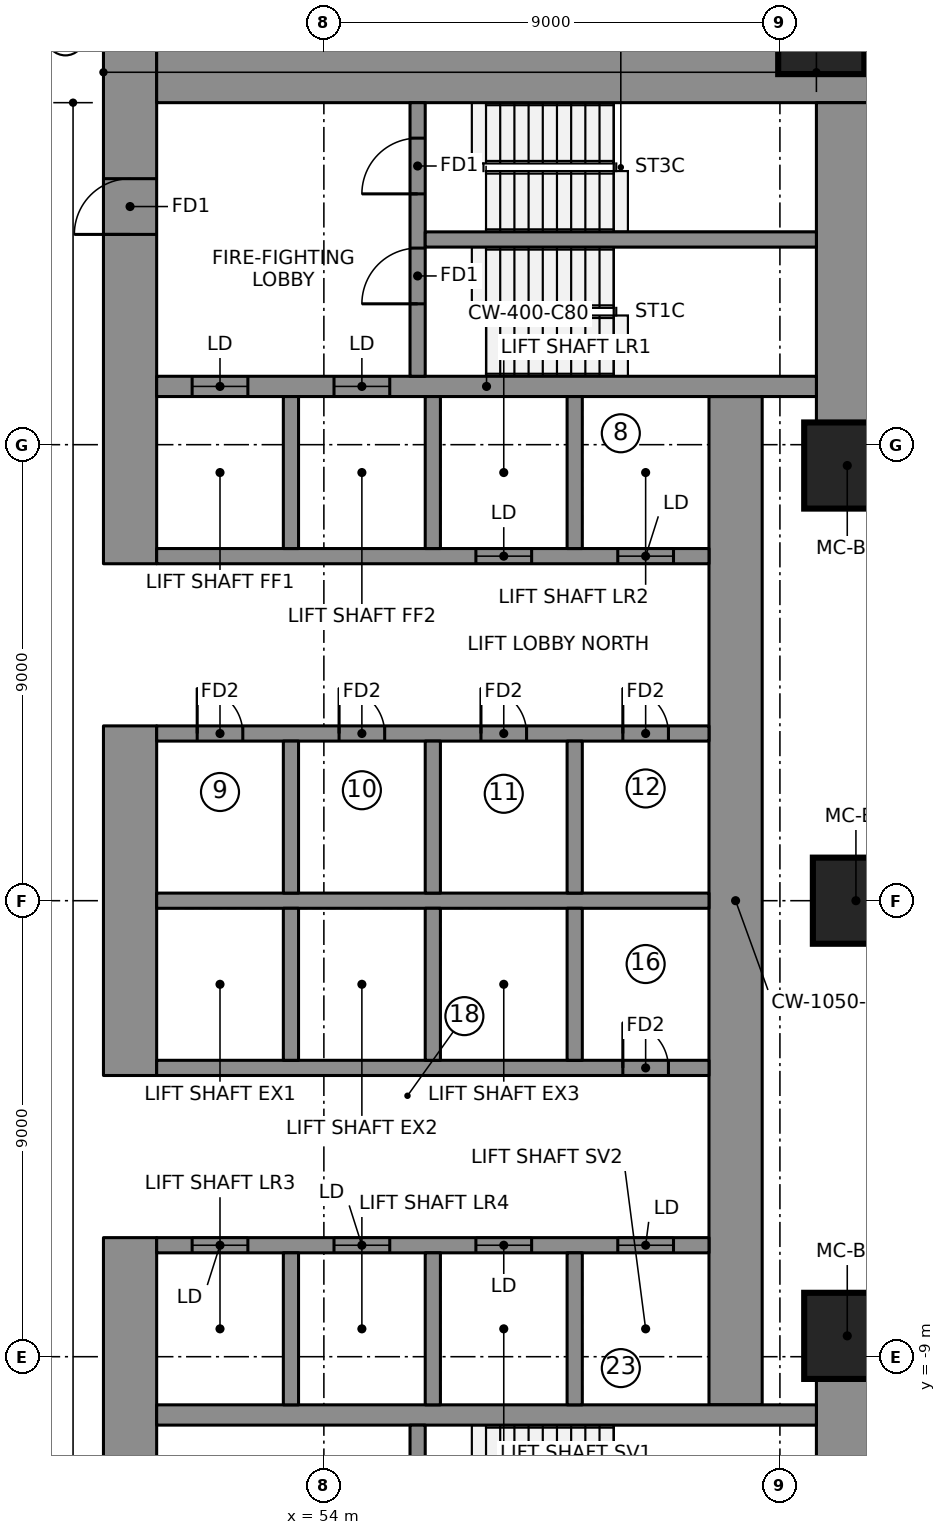
"""IFC4 building model, lengths in metres.
Left out: names, types, materials, properties, quantities, classifications, styles, units other than length and angle.
Written with IfcOpenShell. Run it as: python <this file> out.ifc"""

import sys

from ifc_helpers import new_model, si_unit, direction, frame, frame_2d, origin, origin_2d, place, context, subcontext, project, spatial, rectangle, extrude, element, fill, save


model = new_model("IFC4")
c1 = context("Model", 3, precision=1e-05, world=origin(), true_north=direction((0.0, 1.0)))
c2 = subcontext(c1, "Body", "Model", "MODEL_VIEW")
j1 = project(units=[si_unit("LENGTHUNIT", "METRE"), si_unit("PLANEANGLEUNIT", "RADIAN")], contexts=[c1])
p1 = place(None, origin())
s1 = spatial("IfcSite", under=j1, at=p1, CompositionType="ELEMENT")
p2 = place(p1, origin())
s2 = spatial("IfcBuilding", under=s1, at=p2, CompositionType="ELEMENT")
p3 = place(p2, frame((0.0, 0.0, 88.45)))
s3 = spatial("IfcBuildingStorey", under=s2, at=p3, CompositionType="ELEMENT", Elevation=88.45)
p4 = place(p3, frame((50.175, 6.65, 0.0), z_axis=(0.0, 0.0, 1.0), x_axis=(0.0, 1.0, 0.0)))
e1 = element("IfcWall", 1, at=p4, inside=s3, PredefinedType="SHEAR", context=c2, shape_type="SweptSolid", body=[
    extrude(rectangle(XDim=10.15, YDim=1.05, at=frame_2d((5.075, 0.0))), origin(), (0.0, 0.0, 1.0), 3.55),
])
p5 = place(p4, frame((6.5, 0.0, 0.0)))
e2 = element("IfcOpeningElement", 2, at=p5, cuts=e1, PredefinedType="OPENING", context=c2, shape_type="SweptSolid", body=[
    extrude(rectangle(XDim=1.1, YDim=2.1, at=frame_2d((0.55, 1.05))), frame((0.0, 0.535, 0.0), z_axis=(0.0, -1.0, 0.0), x_axis=(1.0, 0.0, 0.0)), (0.0, 0.0, 1.0), 1.07),
])
p6 = place(p3, frame((50.175, -3.45, 0.0), z_axis=(0.0, 0.0, 1.0), x_axis=(0.0, 1.0, 0.0)))
e3 = element("IfcWall", 3, at=p6, inside=s3, PredefinedType="SHEAR", context=c2, shape_type="SweptSolid", body=[
    extrude(rectangle(XDim=6.9, YDim=1.05, at=frame_2d((3.45, 0.0))), origin(), (0.0, 0.0, 1.0), 3.55),
])
p7 = place(p3, frame((50.175, -16.8, 0.0), z_axis=(0.0, 0.0, 1.0), x_axis=(0.0, 1.0, 0.0)))
e4 = element("IfcWall", 4, at=p7, inside=s3, PredefinedType="SHEAR", context=c2, shape_type="SweptSolid", body=[
    extrude(rectangle(XDim=10.15, YDim=1.05, at=frame_2d((5.075, 0.0))), origin(), (0.0, 0.0, 1.0), 3.55),
])
p8 = place(p7, frame((2.55, 0.0, 0.0)))
e5 = element("IfcOpeningElement", 5, at=p8, cuts=e4, PredefinedType="OPENING", context=c2, shape_type="SweptSolid", body=[
    extrude(rectangle(XDim=1.1, YDim=2.1, at=frame_2d((0.55, 1.05))), frame((0.0, 0.535, 0.0), z_axis=(0.0, -1.0, 0.0), x_axis=(1.0, 0.0, 0.0)), (0.0, 0.0, 1.0), 1.07),
])
p9 = place(p3, frame((50.7, 16.275, 0.0), z_axis=(0.0, 0.0, 1.0), x_axis=(1.0, 0.0, 0.0)))
e6 = element("IfcWall", 6, at=p9, inside=s3, PredefinedType="SHEAR", context=c2, shape_type="SweptSolid", body=[
    extrude(rectangle(XDim=14.07, YDim=1.05, at=frame_2d((7.035, 0.0))), origin(), (0.0, 0.0, 1.0), 3.55),
])
for number, where, z_axis, x_axis in (
    (7, (64.245, 9.389, 0.0), (0.0, 0.0, 1.0), (0.0, 1.0, 0.0)),
    (8, (64.245, -15.75, 0.0), (0.0, 0.0, 1.0), (0.0, 1.0, 0.0)),
):
    element("IfcWall", number, at=place(p3, frame(where, z_axis=z_axis, x_axis=x_axis)), inside=s3, PredefinedType="SHEAR", context=c2, shape_type="SweptSolid", body=[
        extrude(rectangle(XDim=6.361, YDim=1.05, at=frame_2d((3.181, 0.0))), origin(), (0.0, 0.0, 1.0), 3.55),
    ])
p10 = place(p3, frame((62.125, -9.95, 0.0), z_axis=(0.0, 0.0, 1.0), x_axis=(0.0, 1.0, 0.0)))
e9 = element("IfcWall", 9, at=p10, inside=s3, PredefinedType="SHEAR", context=c2, shape_type="SweptSolid", body=[
    extrude(rectangle(XDim=19.9, YDim=1.05, at=frame_2d((9.95, 0.0))), origin(), (0.0, 0.0, 1.0), 3.55),
])
p11 = place(p3, frame((50.7, 10.15, 0.0), z_axis=(0.0, 0.0, 1.0), x_axis=(1.0, 0.0, 0.0)))
e10 = element("IfcWall", 10, at=p11, inside=s3, PredefinedType="SHEAR", context=c2, shape_type="SweptSolid", body=[
    extrude(rectangle(XDim=13.02, YDim=0.4, at=frame_2d((6.51, 0.0))), origin(), (0.0, 0.0, 1.0), 3.55),
])
p12 = place(p11, frame((0.7, 0.0, 0.0)))
e11 = element("IfcOpeningElement", 11, at=p12, cuts=e10, PredefinedType="OPENING", context=c2, shape_type="SweptSolid", body=[
    extrude(rectangle(XDim=1.1, YDim=2.1, at=frame_2d((0.55, 1.05))), frame((0.0, 0.21, 0.0), z_axis=(0.0, -1.0, 0.0), x_axis=(1.0, 0.0, 0.0)), (0.0, 0.0, 1.0), 0.42),
])
p13 = place(p11, frame((3.5, 0.0, 0.0)))
e12 = element("IfcOpeningElement", 12, at=p13, cuts=e10, PredefinedType="OPENING", context=c2, shape_type="SweptSolid", body=[
    extrude(rectangle(XDim=1.1, YDim=2.1, at=frame_2d((0.55, 1.05))), frame((0.0, 0.21, 0.0), z_axis=(0.0, -1.0, 0.0), x_axis=(1.0, 0.0, 0.0)), (0.0, 0.0, 1.0), 0.42),
])
p14 = place(p3, frame((50.7, -10.15, 0.0), z_axis=(0.0, 0.0, 1.0), x_axis=(1.0, 0.0, 0.0)))
e13 = element("IfcWall", 13, at=p14, inside=s3, PredefinedType="SHEAR", context=c2, shape_type="SweptSolid", body=[
    extrude(rectangle(XDim=13.02, YDim=0.4, at=frame_2d((6.51, 0.0))), origin(), (0.0, 0.0, 1.0), 3.55),
])
p15 = place(p3, frame((50.7, 0.0, 0.0), z_axis=(0.0, 0.0, 1.0), x_axis=(1.0, 0.0, 0.0)))
e14 = element("IfcWall", 14, at=p15, inside=s3, PredefinedType="SHEAR", context=c2, shape_type="SweptSolid", body=[
    extrude(rectangle(XDim=10.9, YDim=0.3, at=frame_2d((5.45, 0.0))), origin(), (0.0, 0.0, 1.0), 3.55),
])
p16 = place(p3, frame((50.7, 3.3, 0.0), z_axis=(0.0, 0.0, 1.0), x_axis=(1.0, 0.0, 0.0)))
e15 = element("IfcWall", 15, at=p16, inside=s3, PredefinedType="SHEAR", context=c2, shape_type="SweptSolid", body=[
    extrude(rectangle(XDim=10.9, YDim=0.3, at=frame_2d((5.45, 0.0))), origin(), (0.0, 0.0, 1.0), 3.55),
])
p17 = place(p16, frame((0.8, 0.0, 0.0)))
e16 = element("IfcOpeningElement", 16, at=p17, cuts=e15, PredefinedType="OPENING", context=c2, shape_type="SweptSolid", body=[
    extrude(rectangle(XDim=0.9, YDim=2.1, at=frame_2d((0.45, 1.05))), frame((0.0, 0.16, 0.0), z_axis=(0.0, -1.0, 0.0), x_axis=(1.0, 0.0, 0.0)), (0.0, 0.0, 1.0), 0.32),
])
p18 = place(p16, frame((3.6, 0.0, 0.0)))
e17 = element("IfcOpeningElement", 17, at=p18, cuts=e15, PredefinedType="OPENING", context=c2, shape_type="SweptSolid", body=[
    extrude(rectangle(XDim=0.9, YDim=2.1, at=frame_2d((0.45, 1.05))), frame((0.0, 0.16, 0.0), z_axis=(0.0, -1.0, 0.0), x_axis=(1.0, 0.0, 0.0)), (0.0, 0.0, 1.0), 0.32),
])
p19 = place(p16, frame((6.4, 0.0, 0.0)))
e18 = element("IfcOpeningElement", 18, at=p19, cuts=e15, PredefinedType="OPENING", context=c2, shape_type="SweptSolid", body=[
    extrude(rectangle(XDim=0.9, YDim=2.1, at=frame_2d((0.45, 1.05))), frame((0.0, 0.16, 0.0), z_axis=(0.0, -1.0, 0.0), x_axis=(1.0, 0.0, 0.0)), (0.0, 0.0, 1.0), 0.32),
])
p20 = place(p16, frame((9.2, 0.0, 0.0)))
e19 = element("IfcOpeningElement", 19, at=p20, cuts=e15, PredefinedType="OPENING", context=c2, shape_type="SweptSolid", body=[
    extrude(rectangle(XDim=0.9, YDim=2.1, at=frame_2d((0.45, 1.05))), frame((0.0, 0.16, 0.0), z_axis=(0.0, -1.0, 0.0), x_axis=(1.0, 0.0, 0.0)), (0.0, 0.0, 1.0), 0.32),
])
p21 = place(p3, frame((50.7, 6.8, 0.0), z_axis=(0.0, 0.0, 1.0), x_axis=(1.0, 0.0, 0.0)))
e20 = element("IfcWall", 20, at=p21, inside=s3, PredefinedType="SHEAR", context=c2, shape_type="SweptSolid", body=[
    extrude(rectangle(XDim=10.9, YDim=0.3, at=frame_2d((5.45, 0.0))), origin(), (0.0, 0.0, 1.0), 3.55),
])
p22 = place(p21, frame((6.3, 0.0, 0.0)))
e21 = element("IfcOpeningElement", 21, at=p22, cuts=e20, PredefinedType="OPENING", context=c2, shape_type="SweptSolid", body=[
    extrude(rectangle(XDim=1.1, YDim=2.1, at=frame_2d((0.55, 1.05))), frame((0.0, 0.16, 0.0), z_axis=(0.0, -1.0, 0.0), x_axis=(1.0, 0.0, 0.0)), (0.0, 0.0, 1.0), 0.32),
])
p23 = place(p21, frame((9.1, 0.0, 0.0)))
e22 = element("IfcOpeningElement", 22, at=p23, cuts=e20, PredefinedType="OPENING", context=c2, shape_type="SweptSolid", body=[
    extrude(rectangle(XDim=1.1, YDim=2.1, at=frame_2d((0.55, 1.05))), frame((0.0, 0.16, 0.0), z_axis=(0.0, -1.0, 0.0), x_axis=(1.0, 0.0, 0.0)), (0.0, 0.0, 1.0), 0.32),
])
for number, where, z_axis, x_axis in (
    (23, (53.35, 0.15, 0.0), (0.0, 0.0, 1.0), (0.0, 1.0, 0.0)),
    (24, (53.35, 6.95, 0.0), (0.0, 0.0, 1.0), (0.0, 1.0, 0.0)),
    (25, (56.15, 0.15, 0.0), (0.0, 0.0, 1.0), (0.0, 1.0, 0.0)),
    (26, (56.15, 6.95, 0.0), (0.0, 0.0, 1.0), (0.0, 1.0, 0.0)),
    (27, (58.95, 0.15, 0.0), (0.0, 0.0, 1.0), (0.0, 1.0, 0.0)),
    (28, (58.95, 6.95, 0.0), (0.0, 0.0, 1.0), (0.0, 1.0, 0.0)),
):
    element("IfcWall", number, at=place(p3, frame(where, z_axis=z_axis, x_axis=x_axis)), inside=s3, PredefinedType="SHEAR", context=c2, shape_type="SweptSolid", body=[
        extrude(rectangle(XDim=3.0, YDim=0.3, at=frame_2d((1.5, 0.0))), origin(), (0.0, 0.0, 1.0), 3.55),
    ])
p24 = place(p3, frame((50.7, -3.3, 0.0), z_axis=(0.0, 0.0, 1.0), x_axis=(1.0, 0.0, 0.0)))
e29 = element("IfcWall", 29, at=p24, inside=s3, PredefinedType="SHEAR", context=c2, shape_type="SweptSolid", body=[
    extrude(rectangle(XDim=10.9, YDim=0.3, at=frame_2d((5.45, 0.0))), origin(), (0.0, 0.0, 1.0), 3.55),
])
p25 = place(p24, frame((9.2, 0.0, 0.0)))
e30 = element("IfcOpeningElement", 30, at=p25, cuts=e29, PredefinedType="OPENING", context=c2, shape_type="SweptSolid", body=[
    extrude(rectangle(XDim=0.9, YDim=2.1, at=frame_2d((0.45, 1.05))), frame((0.0, 0.16, 0.0), z_axis=(0.0, -1.0, 0.0), x_axis=(1.0, 0.0, 0.0)), (0.0, 0.0, 1.0), 0.32),
])
p26 = place(p3, frame((50.7, -6.8, 0.0), z_axis=(0.0, 0.0, 1.0), x_axis=(1.0, 0.0, 0.0)))
e31 = element("IfcWall", 31, at=p26, inside=s3, PredefinedType="SHEAR", context=c2, shape_type="SweptSolid", body=[
    extrude(rectangle(XDim=10.9, YDim=0.3, at=frame_2d((5.45, 0.0))), origin(), (0.0, 0.0, 1.0), 3.55),
])
p27 = place(p26, frame((0.7, 0.0, 0.0)))
e32 = element("IfcOpeningElement", 32, at=p27, cuts=e31, PredefinedType="OPENING", context=c2, shape_type="SweptSolid", body=[
    extrude(rectangle(XDim=1.1, YDim=2.1, at=frame_2d((0.55, 1.05))), frame((0.0, 0.16, 0.0), z_axis=(0.0, -1.0, 0.0), x_axis=(1.0, 0.0, 0.0)), (0.0, 0.0, 1.0), 0.32),
])
p28 = place(p26, frame((3.5, 0.0, 0.0)))
e33 = element("IfcOpeningElement", 33, at=p28, cuts=e31, PredefinedType="OPENING", context=c2, shape_type="SweptSolid", body=[
    extrude(rectangle(XDim=1.1, YDim=2.1, at=frame_2d((0.55, 1.05))), frame((0.0, 0.16, 0.0), z_axis=(0.0, -1.0, 0.0), x_axis=(1.0, 0.0, 0.0)), (0.0, 0.0, 1.0), 0.32),
])
p29 = place(p26, frame((6.3, 0.0, 0.0)))
e34 = element("IfcOpeningElement", 34, at=p29, cuts=e31, PredefinedType="OPENING", context=c2, shape_type="SweptSolid", body=[
    extrude(rectangle(XDim=1.1, YDim=2.1, at=frame_2d((0.55, 1.05))), frame((0.0, 0.16, 0.0), z_axis=(0.0, -1.0, 0.0), x_axis=(1.0, 0.0, 0.0)), (0.0, 0.0, 1.0), 0.32),
])
p30 = place(p26, frame((9.1, 0.0, 0.0)))
e35 = element("IfcOpeningElement", 35, at=p30, cuts=e31, PredefinedType="OPENING", context=c2, shape_type="SweptSolid", body=[
    extrude(rectangle(XDim=1.1, YDim=2.1, at=frame_2d((0.55, 1.05))), frame((0.0, 0.16, 0.0), z_axis=(0.0, -1.0, 0.0), x_axis=(1.0, 0.0, 0.0)), (0.0, 0.0, 1.0), 0.32),
])
for number, where, z_axis, x_axis in (
    (36, (53.35, -3.15, 0.0), (0.0, 0.0, 1.0), (0.0, 1.0, 0.0)),
    (37, (53.35, -9.95, 0.0), (0.0, 0.0, 1.0), (0.0, 1.0, 0.0)),
    (38, (56.15, -3.15, 0.0), (0.0, 0.0, 1.0), (0.0, 1.0, 0.0)),
    (39, (56.15, -9.95, 0.0), (0.0, 0.0, 1.0), (0.0, 1.0, 0.0)),
    (40, (58.95, -3.15, 0.0), (0.0, 0.0, 1.0), (0.0, 1.0, 0.0)),
    (41, (58.95, -9.95, 0.0), (0.0, 0.0, 1.0), (0.0, 1.0, 0.0)),
):
    element("IfcWall", number, at=place(p3, frame(where, z_axis=z_axis, x_axis=x_axis)), inside=s3, PredefinedType="SHEAR", context=c2, shape_type="SweptSolid", body=[
        extrude(rectangle(XDim=3.0, YDim=0.3, at=frame_2d((1.5, 0.0))), origin(), (0.0, 0.0, 1.0), 3.55),
    ])
p31 = place(p3, frame((55.85, 10.35, 0.0), z_axis=(0.0, 0.0, 1.0), x_axis=(0.0, 1.0, 0.0)))
e42 = element("IfcWall", 42, at=p31, inside=s3, PredefinedType="SHEAR", context=c2, shape_type="SweptSolid", body=[
    extrude(rectangle(XDim=5.4, YDim=0.3, at=frame_2d((2.7, 0.0))), origin(), (0.0, 0.0, 1.0), 3.55),
])
p32 = place(p31, frame((1.43, 0.0, 0.0)))
e43 = element("IfcOpeningElement", 43, at=p32, cuts=e42, PredefinedType="OPENING", context=c2, shape_type="SweptSolid", body=[
    extrude(rectangle(XDim=1.1, YDim=2.1, at=frame_2d((0.55, 1.05))), frame((0.0, 0.16, 0.0), z_axis=(0.0, -1.0, 0.0), x_axis=(1.0, 0.0, 0.0)), (0.0, 0.0, 1.0), 0.32),
])
p33 = place(p31, frame((3.6, 0.0, 0.0)))
e44 = element("IfcOpeningElement", 44, at=p33, cuts=e42, PredefinedType="OPENING", context=c2, shape_type="SweptSolid", body=[
    extrude(rectangle(XDim=1.1, YDim=2.1, at=frame_2d((0.55, 1.05))), frame((0.0, 0.16, 0.0), z_axis=(0.0, -1.0, 0.0), x_axis=(1.0, 0.0, 0.0)), (0.0, 0.0, 1.0), 0.32),
])
p34 = place(p3, frame((55.85, -15.75, 0.0), z_axis=(0.0, 0.0, 1.0), x_axis=(0.0, 1.0, 0.0)))
e45 = element("IfcWall", 45, at=p34, inside=s3, PredefinedType="SHEAR", context=c2, shape_type="SweptSolid", body=[
    extrude(rectangle(XDim=5.4, YDim=0.3, at=frame_2d((2.7, 0.0))), origin(), (0.0, 0.0, 1.0), 3.55),
])
p35 = place(p34, frame((3.6, 0.0, 0.0)))
e46 = element("IfcOpeningElement", 46, at=p35, cuts=e45, PredefinedType="OPENING", context=c2, shape_type="SweptSolid", body=[
    extrude(rectangle(XDim=1.1, YDim=2.1, at=frame_2d((0.55, 1.05))), frame((0.0, 0.16, 0.0), z_axis=(0.0, -1.0, 0.0), x_axis=(1.0, 0.0, 0.0)), (0.0, 0.0, 1.0), 0.32),
])
p36 = place(p34, frame((0.8, 0.0, 0.0)))
e47 = element("IfcOpeningElement", 47, at=p36, cuts=e45, PredefinedType="OPENING", context=c2, shape_type="SweptSolid", body=[
    extrude(rectangle(XDim=0.9, YDim=2.1, at=frame_2d((0.45, 1.05))), frame((0.0, 0.16, 0.0), z_axis=(0.0, -1.0, 0.0), x_axis=(1.0, 0.0, 0.0)), (0.0, 0.0, 1.0), 0.32),
])
p37 = place(p3, frame((56.0, 13.05, 0.0), z_axis=(0.0, 0.0, 1.0), x_axis=(1.0, 0.0, 0.0)))
e48 = element("IfcWall", 48, at=p37, inside=s3, PredefinedType="SHEAR", context=c2, shape_type="SweptSolid", body=[
    extrude(rectangle(XDim=7.72, YDim=0.3, at=frame_2d((3.86, 0.0))), origin(), (0.0, 0.0, 1.0), 3.55),
])
for number, where, z_axis, x_axis in (
    (49, (64.329, -8.589, 0.0), (0.0, 0.0, 1.0), (1.0, 0.0, 0.0)),
    (50, (64.5, 0.0, 0.0), (0.0, 0.0, 1.0), (1.0, 0.0, 0.0)),
    (51, (64.329, 8.589, 0.0), (0.0, 0.0, 1.0), (1.0, 0.0, 0.0)),
    (52, (63.816, 17.164, 0.0), (0.0, 0.0, 1.0), (1.0, 0.0, 0.0)),
):
    element("IfcColumn", number, at=place(p3, frame(where, z_axis=z_axis, x_axis=x_axis)), inside=s3, PredefinedType="COLUMN", context=c2, shape_type="SweptSolid", body=[
        extrude(rectangle(XDim=1.7, YDim=1.7, at=origin_2d()), origin(), (0.0, 0.0, 1.0), 3.55),
    ])
p38 = place(p12, origin())
e53 = element("IfcDoor", 53, at=p38, inside=s3, OperationType="DOUBLE_DOOR_SLIDING", PredefinedType="DOOR", context=c2, shape_type="SweptSolid", body=[
    extrude(rectangle(XDim=1.1, YDim=2.1, at=frame_2d((0.55, 1.05))), frame((0.0, 0.025, 0.0), z_axis=(0.0, -1.0, 0.0), x_axis=(1.0, 0.0, 0.0)), (0.0, 0.0, 1.0), 0.05),
])
fill(e11, e53)
p39 = place(p13, origin())
e54 = element("IfcDoor", 54, at=p39, inside=s3, OperationType="DOUBLE_DOOR_SLIDING", PredefinedType="DOOR", context=c2, shape_type="SweptSolid", body=[
    extrude(rectangle(XDim=1.1, YDim=2.1, at=frame_2d((0.55, 1.05))), frame((0.0, 0.025, 0.0), z_axis=(0.0, -1.0, 0.0), x_axis=(1.0, 0.0, 0.0)), (0.0, 0.0, 1.0), 0.05),
])
fill(e12, e54)
p40 = place(p22, origin())
e55 = element("IfcDoor", 55, at=p40, inside=s3, OperationType="DOUBLE_DOOR_SLIDING", PredefinedType="DOOR", context=c2, shape_type="SweptSolid", body=[
    extrude(rectangle(XDim=1.1, YDim=2.1, at=frame_2d((0.55, 1.05))), frame((0.0, 0.025, 0.0), z_axis=(0.0, -1.0, 0.0), x_axis=(1.0, 0.0, 0.0)), (0.0, 0.0, 1.0), 0.05),
])
fill(e21, e55)
p41 = place(p23, origin())
e56 = element("IfcDoor", 56, at=p41, inside=s3, OperationType="DOUBLE_DOOR_SLIDING", PredefinedType="DOOR", context=c2, shape_type="SweptSolid", body=[
    extrude(rectangle(XDim=1.1, YDim=2.1, at=frame_2d((0.55, 1.05))), frame((0.0, 0.025, 0.0), z_axis=(0.0, -1.0, 0.0), x_axis=(1.0, 0.0, 0.0)), (0.0, 0.0, 1.0), 0.05),
])
fill(e22, e56)
p42 = place(p27, origin())
e57 = element("IfcDoor", 57, at=p42, inside=s3, OperationType="DOUBLE_DOOR_SLIDING", PredefinedType="DOOR", context=c2, shape_type="SweptSolid", body=[
    extrude(rectangle(XDim=1.1, YDim=2.1, at=frame_2d((0.55, 1.05))), frame((0.0, 0.025, 0.0), z_axis=(0.0, -1.0, 0.0), x_axis=(1.0, 0.0, 0.0)), (0.0, 0.0, 1.0), 0.05),
])
fill(e32, e57)
p43 = place(p28, origin())
e58 = element("IfcDoor", 58, at=p43, inside=s3, OperationType="DOUBLE_DOOR_SLIDING", PredefinedType="DOOR", context=c2, shape_type="SweptSolid", body=[
    extrude(rectangle(XDim=1.1, YDim=2.1, at=frame_2d((0.55, 1.05))), frame((0.0, 0.025, 0.0), z_axis=(0.0, -1.0, 0.0), x_axis=(1.0, 0.0, 0.0)), (0.0, 0.0, 1.0), 0.05),
])
fill(e33, e58)
p44 = place(p29, origin())
e59 = element("IfcDoor", 59, at=p44, inside=s3, OperationType="DOUBLE_DOOR_SLIDING", PredefinedType="DOOR", context=c2, shape_type="SweptSolid", body=[
    extrude(rectangle(XDim=1.1, YDim=2.1, at=frame_2d((0.55, 1.05))), frame((0.0, 0.025, 0.0), z_axis=(0.0, -1.0, 0.0), x_axis=(1.0, 0.0, 0.0)), (0.0, 0.0, 1.0), 0.05),
])
fill(e34, e59)
p45 = place(p30, origin())
e60 = element("IfcDoor", 60, at=p45, inside=s3, OperationType="DOUBLE_DOOR_SLIDING", PredefinedType="DOOR", context=c2, shape_type="SweptSolid", body=[
    extrude(rectangle(XDim=1.1, YDim=2.1, at=frame_2d((0.55, 1.05))), frame((0.0, 0.025, 0.0), z_axis=(0.0, -1.0, 0.0), x_axis=(1.0, 0.0, 0.0)), (0.0, 0.0, 1.0), 0.05),
])
fill(e35, e60)
p46 = place(p32, origin())
e61 = element("IfcDoor", 61, at=p46, inside=s3, OperationType="SINGLE_SWING_RIGHT", PredefinedType="DOOR", context=c2, shape_type="SweptSolid", body=[
    extrude(rectangle(XDim=1.1, YDim=2.1, at=frame_2d((0.55, 1.05))), frame((0.0, 0.025, 0.0), z_axis=(0.0, -1.0, 0.0), x_axis=(1.0, 0.0, 0.0)), (0.0, 0.0, 1.0), 0.05),
])
fill(e43, e61)
p47 = place(p33, origin())
e62 = element("IfcDoor", 62, at=p47, inside=s3, OperationType="SINGLE_SWING_RIGHT", PredefinedType="DOOR", context=c2, shape_type="SweptSolid", body=[
    extrude(rectangle(XDim=1.1, YDim=2.1, at=frame_2d((0.55, 1.05))), frame((0.0, 0.025, 0.0), z_axis=(0.0, -1.0, 0.0), x_axis=(1.0, 0.0, 0.0)), (0.0, 0.0, 1.0), 0.05),
])
fill(e44, e62)
p48 = place(p5, origin())
e63 = element("IfcDoor", 63, at=p48, inside=s3, OperationType="SINGLE_SWING_RIGHT", PredefinedType="DOOR", context=c2, shape_type="SweptSolid", body=[
    extrude(rectangle(XDim=1.1, YDim=2.1, at=frame_2d((0.55, 1.05))), frame((0.0, 0.025, 0.0), z_axis=(0.0, -1.0, 0.0), x_axis=(1.0, 0.0, 0.0)), (0.0, 0.0, 1.0), 0.05),
])
fill(e2, e63)
p49 = place(p17, origin())
e64 = element("IfcDoor", 64, at=p49, inside=s3, OperationType="SINGLE_SWING_LEFT", PredefinedType="DOOR", context=c2, shape_type="SweptSolid", body=[
    extrude(rectangle(XDim=0.9, YDim=2.1, at=frame_2d((0.45, 1.05))), frame((0.0, 0.025, 0.0), z_axis=(0.0, -1.0, 0.0), x_axis=(1.0, 0.0, 0.0)), (0.0, 0.0, 1.0), 0.05),
])
fill(e16, e64)
p50 = place(p18, origin())
e65 = element("IfcDoor", 65, at=p50, inside=s3, OperationType="SINGLE_SWING_LEFT", PredefinedType="DOOR", context=c2, shape_type="SweptSolid", body=[
    extrude(rectangle(XDim=0.9, YDim=2.1, at=frame_2d((0.45, 1.05))), frame((0.0, 0.025, 0.0), z_axis=(0.0, -1.0, 0.0), x_axis=(1.0, 0.0, 0.0)), (0.0, 0.0, 1.0), 0.05),
])
fill(e17, e65)
p51 = place(p19, origin())
e66 = element("IfcDoor", 66, at=p51, inside=s3, OperationType="SINGLE_SWING_LEFT", PredefinedType="DOOR", context=c2, shape_type="SweptSolid", body=[
    extrude(rectangle(XDim=0.9, YDim=2.1, at=frame_2d((0.45, 1.05))), frame((0.0, 0.025, 0.0), z_axis=(0.0, -1.0, 0.0), x_axis=(1.0, 0.0, 0.0)), (0.0, 0.0, 1.0), 0.05),
])
fill(e18, e66)
p52 = place(p20, origin())
e67 = element("IfcDoor", 67, at=p52, inside=s3, OperationType="SINGLE_SWING_LEFT", PredefinedType="DOOR", context=c2, shape_type="SweptSolid", body=[
    extrude(rectangle(XDim=0.9, YDim=2.1, at=frame_2d((0.45, 1.05))), frame((0.0, 0.025, 0.0), z_axis=(0.0, -1.0, 0.0), x_axis=(1.0, 0.0, 0.0)), (0.0, 0.0, 1.0), 0.05),
])
fill(e19, e67)
p53 = place(p25, origin())
e68 = element("IfcDoor", 68, at=p53, inside=s3, OperationType="SINGLE_SWING_LEFT", PredefinedType="DOOR", context=c2, shape_type="SweptSolid", body=[
    extrude(rectangle(XDim=0.9, YDim=2.1, at=frame_2d((0.45, 1.05))), frame((0.0, 0.025, 0.0), z_axis=(0.0, -1.0, 0.0), x_axis=(1.0, 0.0, 0.0)), (0.0, 0.0, 1.0), 0.05),
])
fill(e30, e68)
save(model, sys.argv[1])
